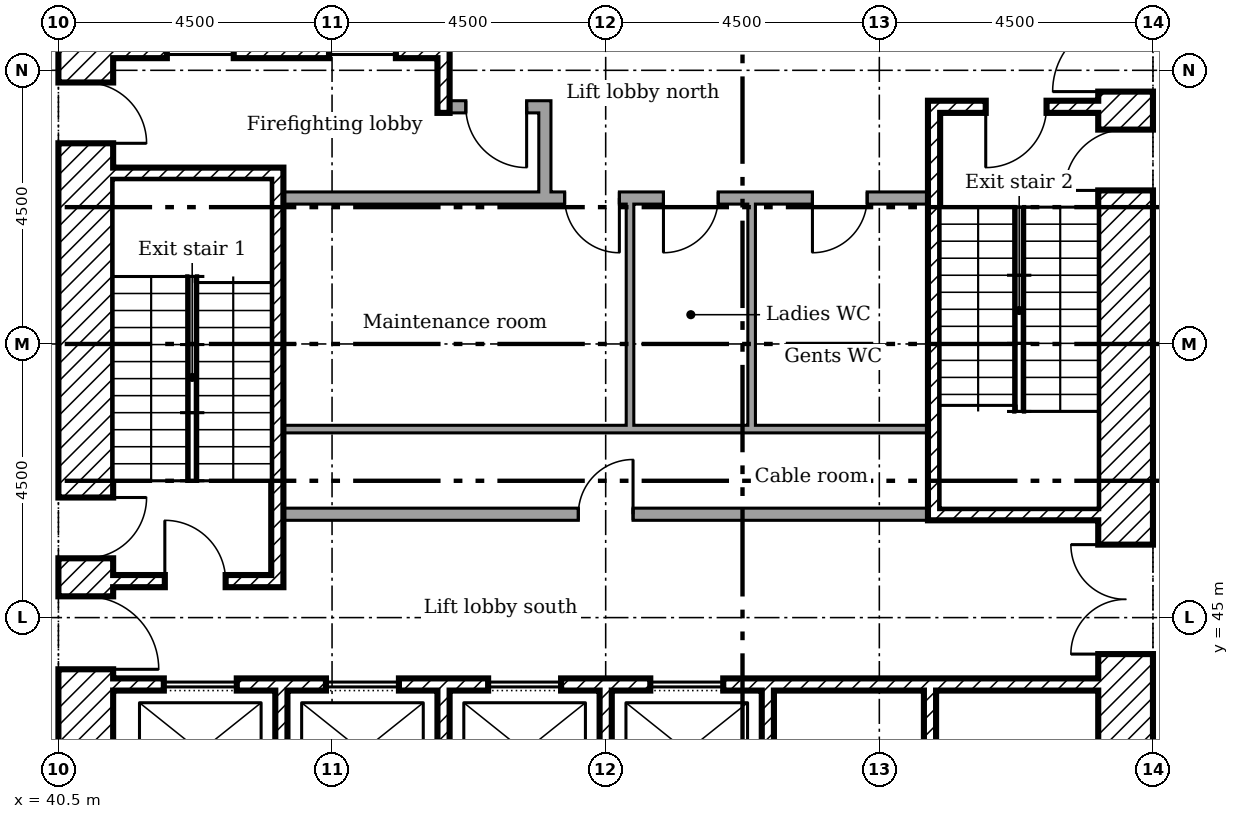
"""IFC4 building model, lengths in metres.
Left out: names, types, materials, properties, quantities, classifications, styles, units other than length and angle.
Written with IfcOpenShell. Run it as: python <this file> out.ifc"""

import sys

from ifc_helpers import new_model, si_unit, direction, frame, frame_2d, origin, place, context, subcontext, project, spatial, rectangle, extrude, element, fill, save


model = new_model("IFC4")
c1 = context("Model", 3, precision=1e-05, world=origin(), true_north=direction((0.0, 1.0)))
c2 = subcontext(c1, "Body", "Model", "MODEL_VIEW")
j1 = project(units=[si_unit("LENGTHUNIT", "METRE"), si_unit("PLANEANGLEUNIT", "RADIAN")], contexts=[c1])
p1 = place(None, origin())
s1 = spatial("IfcSite", under=j1, at=p1, CompositionType="ELEMENT")
p2 = place(p1, origin())
s2 = spatial("IfcBuilding", under=s1, at=p2, CompositionType="ELEMENT")
p3 = place(p2, frame((0.0, 0.0, 43.0)))
s3 = spatial("IfcBuildingStorey", under=s2, at=p3, CompositionType="ELEMENT", Elevation=43.0)
p4 = place(p3, frame((58.05, 40.5, 0.0), z_axis=(0.0, 0.0, 1.0), x_axis=(0.0, 1.0, 0.0)))
e1 = element("IfcWall", 1, at=p4, inside=s3, PredefinedType="SHEAR", context=c2, shape_type="SweptSolid", body=[
    extrude(rectangle(XDim=18.0, YDim=0.9, at=frame_2d((9.0, 0.0))), origin(), (0.0, 0.0, 1.0), 4.15),
])
p5 = place(p4, frame((13.15, 0.0, 0.0)))
e2 = element("IfcOpeningElement", 2, at=p5, cuts=e1, PredefinedType="OPENING", context=c2, shape_type="SweptSolid", body=[
    extrude(rectangle(XDim=1.2, YDim=2.1, at=frame_2d((0.6, 1.05))), frame((0.0, 0.46, 0.0), z_axis=(0.0, -1.0, 0.0), x_axis=(1.0, 0.0, 0.0)), (0.0, 0.0, 1.0), 0.92),
])
p6 = place(p4, frame((3.9, 0.0, 0.0)))
e3 = element("IfcOpeningElement", 3, at=p6, cuts=e1, PredefinedType="OPENING", context=c2, shape_type="SweptSolid", body=[
    extrude(rectangle(XDim=1.8, YDim=2.1, at=frame_2d((0.9, 1.05))), frame((0.0, 0.46, 0.0), z_axis=(0.0, -1.0, 0.0), x_axis=(1.0, 0.0, 0.0)), (0.0, 0.0, 1.0), 0.92),
])
p7 = place(p4, frame((11.525, 0.0, 0.0)))
e4 = element("IfcOpeningElement", 4, at=p7, cuts=e1, PredefinedType="OPENING", context=c2, shape_type="SweptSolid", body=[
    extrude(rectangle(XDim=1.0, YDim=2.1, at=frame_2d((0.5, 1.05))), frame((0.0, 0.46, 0.0), z_axis=(0.0, -1.0, 0.0), x_axis=(1.0, 0.0, 0.0)), (0.0, 0.0, 1.0), 0.92),
])
p8 = place(p3, frame((40.95, 40.5, 0.0), z_axis=(0.0, 0.0, 1.0), x_axis=(0.0, 1.0, 0.0)))
e5 = element("IfcWall", 5, at=p8, inside=s3, PredefinedType="SHEAR", context=c2, shape_type="SweptSolid", body=[
    extrude(rectangle(XDim=18.0, YDim=0.9, at=frame_2d((9.0, 0.0))), origin(), (0.0, 0.0, 1.0), 4.15),
])
p9 = place(p8, frame((3.65, 0.0, 0.0)))
e6 = element("IfcOpeningElement", 6, at=p9, cuts=e5, PredefinedType="OPENING", context=c2, shape_type="SweptSolid", body=[
    extrude(rectangle(XDim=1.2, YDim=2.1, at=frame_2d((0.6, 1.05))), frame((0.0, 0.46, 0.0), z_axis=(0.0, -1.0, 0.0), x_axis=(1.0, 0.0, 0.0)), (0.0, 0.0, 1.0), 0.92),
])
p10 = place(p8, frame((5.475, 0.0, 0.0)))
e7 = element("IfcOpeningElement", 7, at=p10, cuts=e5, PredefinedType="OPENING", context=c2, shape_type="SweptSolid", body=[
    extrude(rectangle(XDim=1.0, YDim=2.1, at=frame_2d((0.5, 1.05))), frame((0.0, 0.46, 0.0), z_axis=(0.0, -1.0, 0.0), x_axis=(1.0, 0.0, 0.0)), (0.0, 0.0, 1.0), 0.92),
])
p11 = place(p8, frame((12.3, 0.0, 0.0)))
e8 = element("IfcOpeningElement", 8, at=p11, cuts=e5, PredefinedType="OPENING", context=c2, shape_type="SweptSolid", body=[
    extrude(rectangle(XDim=1.0, YDim=2.1, at=frame_2d((0.5, 1.05))), frame((0.0, 0.46, 0.0), z_axis=(0.0, -1.0, 0.0), x_axis=(1.0, 0.0, 0.0)), (0.0, 0.0, 1.0), 0.92),
])
p12 = place(p3, frame((46.833, 57.6, 0.0), z_axis=(0.0, 0.0, 1.0), x_axis=(0.0, -1.0, 0.0)))
e9 = element("IfcWall", 9, at=p12, inside=s3, PredefinedType="SHEAR", context=c2, shape_type="SweptSolid", body=[
    extrude(rectangle(XDim=4.3, YDim=0.2, at=frame_2d((2.15, 0.0))), origin(), (0.0, 0.0, 1.0), 4.15),
])
for number, where, z_axis, x_axis in (
    (10, (44.167, 41.4, 0.0), (0.0, 0.0, 1.0), (0.0, 1.0, 0.0)),
    (11, (46.833, 41.4, 0.0), (0.0, 0.0, 1.0), (0.0, 1.0, 0.0)),
    (12, (49.5, 41.4, 0.0), (0.0, 0.0, 1.0), (0.0, 1.0, 0.0)),
    (13, (52.167, 41.4, 0.0), (0.0, 0.0, 1.0), (0.0, 1.0, 0.0)),
    (14, (54.833, 41.4, 0.0), (0.0, 0.0, 1.0), (0.0, 1.0, 0.0)),
):
    element("IfcWall", number, at=place(p3, frame(where, z_axis=z_axis, x_axis=x_axis)), inside=s3, PredefinedType="SHEAR", context=c2, shape_type="SweptSolid", body=[
        extrude(rectangle(XDim=2.4, YDim=0.2, at=frame_2d((1.2, 0.0))), origin(), (0.0, 0.0, 1.0), 4.15),
    ])
p13 = place(p3, frame((48.5, 51.9, 0.0), z_axis=(0.0, 0.0, 1.0), x_axis=(0.0, 1.0, 0.0)))
e15 = element("IfcWall", 15, at=p13, inside=s3, PredefinedType="PARTITIONING", context=c2, shape_type="SweptSolid", body=[
    extrude(rectangle(XDim=1.6, YDim=0.2, at=frame_2d((0.8, 0.0))), origin(), (0.0, 0.0, 1.0), 4.15),
])
p14 = place(p3, frame((46.933, 53.4, 0.0)))
e16 = element("IfcWall", 16, at=p14, inside=s3, PredefinedType="PARTITIONING", context=c2, shape_type="SweptSolid", body=[
    extrude(rectangle(XDim=1.467, YDim=0.2, at=frame_2d((0.733, 0.0))), origin(), (0.0, 0.0, 1.0), 4.15),
])
p15 = place(p14, frame((0.267, 0.0, 0.0)))
e17 = element("IfcOpeningElement", 17, at=p15, cuts=e16, PredefinedType="OPENING", context=c2, shape_type="SweptSolid", body=[
    extrude(rectangle(XDim=1.0, YDim=2.1, at=frame_2d((0.5, 1.05))), frame((0.0, 0.11, 0.0), z_axis=(0.0, -1.0, 0.0), x_axis=(1.0, 0.0, 0.0)), (0.0, 0.0, 1.0), 0.22),
])
p16 = place(p3, frame((41.4, 54.3, 0.0)))
e18 = element("IfcWall", 18, at=p16, inside=s3, PredefinedType="SHEAR", context=c2, shape_type="SweptSolid", body=[
    extrude(rectangle(XDim=5.333, YDim=0.2, at=frame_2d((2.667, 0.0))), origin(), (0.0, 0.0, 1.0), 4.15),
])
p17 = place(p16, frame((0.883, 0.0, 0.0)))
e19 = element("IfcOpeningElement", 19, at=p17, cuts=e18, PredefinedType="OPENING", context=c2, shape_type="SweptSolid", body=[
    extrude(rectangle(XDim=1.1, YDim=2.1, at=frame_2d((0.55, 1.05))), frame((0.0, 0.11, 0.0), z_axis=(0.0, -1.0, 0.0), x_axis=(1.0, 0.0, 0.0)), (0.0, 0.0, 1.0), 0.22),
])
p18 = place(p16, frame((3.55, 0.0, 0.0)))
e20 = element("IfcOpeningElement", 20, at=p18, cuts=e18, PredefinedType="OPENING", context=c2, shape_type="SweptSolid", body=[
    extrude(rectangle(XDim=1.1, YDim=2.1, at=frame_2d((0.55, 1.05))), frame((0.0, 0.11, 0.0), z_axis=(0.0, -1.0, 0.0), x_axis=(1.0, 0.0, 0.0)), (0.0, 0.0, 1.0), 0.22),
])
p19 = place(p3, frame((41.4, 43.9, 0.0)))
e21 = element("IfcWall", 21, at=p19, inside=s3, PredefinedType="SHEAR", context=c2, shape_type="SweptSolid", body=[
    extrude(rectangle(XDim=16.2, YDim=0.2, at=frame_2d((8.1, 0.0))), origin(), (0.0, 0.0, 1.0), 4.15),
])
p20 = place(p19, frame((0.833, 0.0, 0.0)))
e22 = element("IfcOpeningElement", 22, at=p20, cuts=e21, PredefinedType="OPENING", context=c2, shape_type="SweptSolid", body=[
    extrude(rectangle(XDim=1.2, YDim=2.1, at=frame_2d((0.6, 1.05))), frame((0.0, 0.11, 0.0), z_axis=(0.0, -1.0, 0.0), x_axis=(1.0, 0.0, 0.0)), (0.0, 0.0, 1.0), 0.22),
])
p21 = place(p19, frame((3.5, 0.0, 0.0)))
e23 = element("IfcOpeningElement", 23, at=p21, cuts=e21, PredefinedType="OPENING", context=c2, shape_type="SweptSolid", body=[
    extrude(rectangle(XDim=1.2, YDim=2.1, at=frame_2d((0.6, 1.05))), frame((0.0, 0.11, 0.0), z_axis=(0.0, -1.0, 0.0), x_axis=(1.0, 0.0, 0.0)), (0.0, 0.0, 1.0), 0.22),
])
p22 = place(p19, frame((6.167, 0.0, 0.0)))
e24 = element("IfcOpeningElement", 24, at=p22, cuts=e21, PredefinedType="OPENING", context=c2, shape_type="SweptSolid", body=[
    extrude(rectangle(XDim=1.2, YDim=2.1, at=frame_2d((0.6, 1.05))), frame((0.0, 0.11, 0.0), z_axis=(0.0, -1.0, 0.0), x_axis=(1.0, 0.0, 0.0)), (0.0, 0.0, 1.0), 0.22),
])
p23 = place(p19, frame((8.833, 0.0, 0.0)))
e25 = element("IfcOpeningElement", 25, at=p23, cuts=e21, PredefinedType="OPENING", context=c2, shape_type="SweptSolid", body=[
    extrude(rectangle(XDim=1.2, YDim=2.1, at=frame_2d((0.6, 1.05))), frame((0.0, 0.11, 0.0), z_axis=(0.0, -1.0, 0.0), x_axis=(1.0, 0.0, 0.0)), (0.0, 0.0, 1.0), 0.22),
])
p24 = place(p3, frame((44.1, 45.5, 0.0), z_axis=(0.0, 0.0, 1.0), x_axis=(0.0, 1.0, 0.0)))
e26 = element("IfcWall", 26, at=p24, inside=s3, PredefinedType="SHEAR", context=c2, shape_type="SweptSolid", body=[
    extrude(rectangle(XDim=6.9, YDim=0.2, at=frame_2d((3.45, 0.0))), origin(), (0.0, 0.0, 1.0), 4.15),
])
p25 = place(p3, frame((41.4, 52.3, 0.0)))
e27 = element("IfcWall", 27, at=p25, inside=s3, PredefinedType="SHEAR", context=c2, shape_type="SweptSolid", body=[
    extrude(rectangle(XDim=2.6, YDim=0.2, at=frame_2d((1.3, 0.0))), origin(), (0.0, 0.0, 1.0), 4.15),
])
p26 = place(p3, frame((41.4, 45.6, 0.0)))
e28 = element("IfcWall", 28, at=p26, inside=s3, PredefinedType="SHEAR", context=c2, shape_type="SweptSolid", body=[
    extrude(rectangle(XDim=2.6, YDim=0.2, at=frame_2d((1.3, 0.0))), origin(), (0.0, 0.0, 1.0), 4.15),
])
p27 = place(p26, frame((0.85, 0.0, 0.0)))
e29 = element("IfcOpeningElement", 29, at=p27, cuts=e28, PredefinedType="OPENING", context=c2, shape_type="SweptSolid", body=[
    extrude(rectangle(XDim=1.0, YDim=2.1, at=frame_2d((0.5, 1.05))), frame((0.0, 0.11, 0.0), z_axis=(0.0, -1.0, 0.0), x_axis=(1.0, 0.0, 0.0)), (0.0, 0.0, 1.0), 0.22),
])
p28 = place(p3, frame((54.8, 53.4, 0.0)))
e30 = element("IfcWall", 30, at=p28, inside=s3, PredefinedType="SHEAR", context=c2, shape_type="SweptSolid", body=[
    extrude(rectangle(XDim=2.8, YDim=0.2, at=frame_2d((1.4, 0.0))), origin(), (0.0, 0.0, 1.0), 4.15),
])
p29 = place(p28, frame((0.95, 0.0, 0.0)))
e31 = element("IfcOpeningElement", 31, at=p29, cuts=e30, PredefinedType="OPENING", context=c2, shape_type="SweptSolid", body=[
    extrude(rectangle(XDim=1.0, YDim=2.1, at=frame_2d((0.5, 1.05))), frame((0.0, 0.11, 0.0), z_axis=(0.0, -1.0, 0.0), x_axis=(1.0, 0.0, 0.0)), (0.0, 0.0, 1.0), 0.22),
])
p30 = place(p3, frame((54.8, 46.7, 0.0)))
e32 = element("IfcWall", 32, at=p30, inside=s3, PredefinedType="SHEAR", context=c2, shape_type="SweptSolid", body=[
    extrude(rectangle(XDim=2.8, YDim=0.2, at=frame_2d((1.4, 0.0))), origin(), (0.0, 0.0, 1.0), 4.15),
])
p31 = place(p3, frame((54.9, 46.8, 0.0), z_axis=(0.0, 0.0, 1.0), x_axis=(0.0, 1.0, 0.0)))
e33 = element("IfcWall", 33, at=p31, inside=s3, PredefinedType="SHEAR", context=c2, shape_type="SweptSolid", body=[
    extrude(rectangle(XDim=6.5, YDim=0.2, at=frame_2d((3.25, 0.0))), origin(), (0.0, 0.0, 1.0), 4.15),
])
p32 = place(p3, frame((44.2, 51.9, 0.0)))
e34 = element("IfcWall", 34, at=p32, inside=s3, PredefinedType="PARTITIONING", context=c2, shape_type="SweptSolid", body=[
    extrude(rectangle(XDim=10.6, YDim=0.2, at=frame_2d((5.3, 0.0))), origin(), (0.0, 0.0, 1.0), 4.15),
])
p33 = place(p32, frame((4.625, 0.0, 0.0)))
e35 = element("IfcOpeningElement", 35, at=p33, cuts=e34, PredefinedType="OPENING", context=c2, shape_type="SweptSolid", body=[
    extrude(rectangle(XDim=0.9, YDim=2.1, at=frame_2d((0.45, 1.05))), frame((0.0, 0.11, 0.0), z_axis=(0.0, -1.0, 0.0), x_axis=(1.0, 0.0, 0.0)), (0.0, 0.0, 1.0), 0.22),
])
p34 = place(p32, frame((6.25, 0.0, 0.0)))
e36 = element("IfcOpeningElement", 36, at=p34, cuts=e34, PredefinedType="OPENING", context=c2, shape_type="SweptSolid", body=[
    extrude(rectangle(XDim=0.9, YDim=2.1, at=frame_2d((0.45, 1.05))), frame((0.0, 0.11, 0.0), z_axis=(0.0, -1.0, 0.0), x_axis=(1.0, 0.0, 0.0)), (0.0, 0.0, 1.0), 0.22),
])
p35 = place(p32, frame((8.7, 0.0, 0.0)))
e37 = element("IfcOpeningElement", 37, at=p35, cuts=e34, PredefinedType="OPENING", context=c2, shape_type="SweptSolid", body=[
    extrude(rectangle(XDim=0.9, YDim=2.1, at=frame_2d((0.45, 1.05))), frame((0.0, 0.11, 0.0), z_axis=(0.0, -1.0, 0.0), x_axis=(1.0, 0.0, 0.0)), (0.0, 0.0, 1.0), 0.22),
])
p36 = place(p3, frame((44.2, 46.7, 0.0)))
e38 = element("IfcWall", 38, at=p36, inside=s3, PredefinedType="PARTITIONING", context=c2, shape_type="SweptSolid", body=[
    extrude(rectangle(XDim=10.6, YDim=0.2, at=frame_2d((5.3, 0.0))), origin(), (0.0, 0.0, 1.0), 4.15),
])
p37 = place(p36, frame((4.85, 0.0, 0.0)))
e39 = element("IfcOpeningElement", 39, at=p37, cuts=e38, PredefinedType="OPENING", context=c2, shape_type="SweptSolid", body=[
    extrude(rectangle(XDim=0.9, YDim=2.1, at=frame_2d((0.45, 1.05))), frame((0.0, 0.11, 0.0), z_axis=(0.0, -1.0, 0.0), x_axis=(1.0, 0.0, 0.0)), (0.0, 0.0, 1.0), 0.22),
])
p38 = place(p3, frame((49.962, 48.1, 0.0), z_axis=(0.0, 0.0, 1.0), x_axis=(-1.0, 0.0, 0.0)))
e40 = element("IfcWall", 40, at=p38, inside=s3, PredefinedType="PARTITIONING", context=c2, shape_type="SweptSolid", body=[
    extrude(rectangle(XDim=5.762, YDim=0.125, at=frame_2d((2.881, 0.0))), origin(), (0.0, 0.0, 1.0), 4.15),
])
p39 = place(p3, frame((51.962, 48.1, 0.0), z_axis=(0.0, 0.0, 1.0), x_axis=(-1.0, 0.0, 0.0)))
e41 = element("IfcWall", 41, at=p39, inside=s3, PredefinedType="PARTITIONING", context=c2, shape_type="SweptSolid", body=[
    extrude(rectangle(XDim=2.062, YDim=0.125, at=frame_2d((1.031, 0.0))), origin(), (0.0, 0.0, 1.0), 4.15),
])
p40 = place(p3, frame((49.9, 48.163, 0.0), z_axis=(0.0, 0.0, 1.0), x_axis=(0.0, 1.0, 0.0)))
e42 = element("IfcWall", 42, at=p40, inside=s3, PredefinedType="PARTITIONING", context=c2, shape_type="SweptSolid", body=[
    extrude(rectangle(XDim=3.637, YDim=0.125, at=frame_2d((1.819, 0.0))), origin(), (0.0, 0.0, 1.0), 4.15),
])
p41 = place(p3, frame((54.8, 48.1, 0.0), z_axis=(0.0, 0.0, 1.0), x_axis=(-1.0, 0.0, 0.0)))
e43 = element("IfcWall", 43, at=p41, inside=s3, PredefinedType="PARTITIONING", context=c2, shape_type="SweptSolid", body=[
    extrude(rectangle(XDim=2.9, YDim=0.125, at=frame_2d((1.45, 0.0))), origin(), (0.0, 0.0, 1.0), 4.15),
])
p42 = place(p3, frame((51.9, 48.163, 0.0), z_axis=(0.0, 0.0, 1.0), x_axis=(0.0, 1.0, 0.0)))
e44 = element("IfcWall", 44, at=p42, inside=s3, PredefinedType="PARTITIONING", context=c2, shape_type="SweptSolid", body=[
    extrude(rectangle(XDim=3.637, YDim=0.125, at=frame_2d((1.819, 0.0))), origin(), (0.0, 0.0, 1.0), 4.15),
])
p43 = place(p5, origin())
e45 = element("IfcDoor", 45, at=p43, inside=s3, OperationType="SINGLE_SWING_RIGHT", PredefinedType="DOOR", context=c2, shape_type="SweptSolid", body=[
    extrude(rectangle(XDim=1.2, YDim=2.1, at=frame_2d((0.6, 1.05))), frame((0.0, 0.025, 0.0), z_axis=(0.0, -1.0, 0.0), x_axis=(1.0, 0.0, 0.0)), (0.0, 0.0, 1.0), 0.05),
])
fill(e2, e45)
p44 = place(p6, origin())
e46 = element("IfcDoor", 46, at=p44, inside=s3, OperationType="DOUBLE_DOOR_SINGLE_SWING", PredefinedType="DOOR", context=c2, shape_type="SweptSolid", body=[
    extrude(rectangle(XDim=1.8, YDim=2.1, at=frame_2d((0.9, 1.05))), frame((0.0, 0.025, 0.0), z_axis=(0.0, -1.0, 0.0), x_axis=(1.0, 0.0, 0.0)), (0.0, 0.0, 1.0), 0.05),
])
fill(e3, e46)
p45 = place(p9, frame((1.2, 0.0, 0.0), x_axis=(-1.0, 0.0, 0.0)))
e47 = element("IfcDoor", 47, at=p45, inside=s3, OperationType="SINGLE_SWING_LEFT", PredefinedType="DOOR", context=c2, shape_type="SweptSolid", body=[
    extrude(rectangle(XDim=1.2, YDim=2.1, at=frame_2d((0.6, 1.05))), frame((0.0, 0.025, 0.0), z_axis=(0.0, -1.0, 0.0), x_axis=(1.0, 0.0, 0.0)), (0.0, 0.0, 1.0), 0.05),
])
fill(e6, e47)
p46 = place(p27, origin())
e48 = element("IfcDoor", 48, at=p46, inside=s3, OperationType="SINGLE_SWING_RIGHT", PredefinedType="DOOR", context=c2, shape_type="SweptSolid", body=[
    extrude(rectangle(XDim=1.0, YDim=2.1, at=frame_2d((0.5, 1.05))), frame((0.0, 0.025, 0.0), z_axis=(0.0, -1.0, 0.0), x_axis=(1.0, 0.0, 0.0)), (0.0, 0.0, 1.0), 0.05),
])
fill(e29, e48)
p47 = place(p10, frame((1.0, 0.0, 0.0), x_axis=(-1.0, 0.0, 0.0)))
e49 = element("IfcDoor", 49, at=p47, inside=s3, OperationType="SINGLE_SWING_RIGHT", PredefinedType="DOOR", context=c2, shape_type="SweptSolid", body=[
    extrude(rectangle(XDim=1.0, YDim=2.1, at=frame_2d((0.5, 1.05))), frame((0.0, 0.025, 0.0), z_axis=(0.0, -1.0, 0.0), x_axis=(1.0, 0.0, 0.0)), (0.0, 0.0, 1.0), 0.05),
])
fill(e7, e49)
p48 = place(p29, frame((1.0, 0.0, 0.0), x_axis=(-1.0, 0.0, 0.0)))
e50 = element("IfcDoor", 50, at=p48, inside=s3, OperationType="SINGLE_SWING_LEFT", PredefinedType="DOOR", context=c2, shape_type="SweptSolid", body=[
    extrude(rectangle(XDim=1.0, YDim=2.1, at=frame_2d((0.5, 1.05))), frame((0.0, 0.025, 0.0), z_axis=(0.0, -1.0, 0.0), x_axis=(1.0, 0.0, 0.0)), (0.0, 0.0, 1.0), 0.05),
])
fill(e31, e50)
p49 = place(p7, origin())
e51 = element("IfcDoor", 51, at=p49, inside=s3, OperationType="SINGLE_SWING_RIGHT", PredefinedType="DOOR", context=c2, shape_type="SweptSolid", body=[
    extrude(rectangle(XDim=1.0, YDim=2.1, at=frame_2d((0.5, 1.05))), frame((0.0, 0.025, 0.0), z_axis=(0.0, -1.0, 0.0), x_axis=(1.0, 0.0, 0.0)), (0.0, 0.0, 1.0), 0.05),
])
fill(e4, e51)
p50 = place(p15, frame((1.0, 0.0, 0.0), x_axis=(-1.0, 0.0, 0.0)))
e52 = element("IfcDoor", 52, at=p50, inside=s3, OperationType="SINGLE_SWING_RIGHT", PredefinedType="DOOR", context=c2, shape_type="SweptSolid", body=[
    extrude(rectangle(XDim=1.0, YDim=2.1, at=frame_2d((0.5, 1.05))), frame((0.0, 0.025, 0.0), z_axis=(0.0, -1.0, 0.0), x_axis=(1.0, 0.0, 0.0)), (0.0, 0.0, 1.0), 0.05),
])
fill(e17, e52)
p51 = place(p11, frame((1.0, 0.0, 0.0), x_axis=(-1.0, 0.0, 0.0)))
e53 = element("IfcDoor", 53, at=p51, inside=s3, OperationType="SINGLE_SWING_LEFT", PredefinedType="DOOR", context=c2, shape_type="SweptSolid", body=[
    extrude(rectangle(XDim=1.0, YDim=2.1, at=frame_2d((0.5, 1.05))), frame((0.0, 0.025, 0.0), z_axis=(0.0, -1.0, 0.0), x_axis=(1.0, 0.0, 0.0)), (0.0, 0.0, 1.0), 0.05),
])
fill(e8, e53)
p52 = place(p37, origin())
e54 = element("IfcDoor", 54, at=p52, inside=s3, OperationType="SINGLE_SWING_LEFT", PredefinedType="DOOR", context=c2, shape_type="SweptSolid", body=[
    extrude(rectangle(XDim=0.9, YDim=2.1, at=frame_2d((0.45, 1.05))), frame((0.0, 0.025, 0.0), z_axis=(0.0, -1.0, 0.0), x_axis=(1.0, 0.0, 0.0)), (0.0, 0.0, 1.0), 0.05),
])
fill(e39, e54)
p53 = place(p33, frame((0.9, 0.0, 0.0), x_axis=(-1.0, 0.0, 0.0)))
e55 = element("IfcDoor", 55, at=p53, inside=s3, OperationType="SINGLE_SWING_RIGHT", PredefinedType="DOOR", context=c2, shape_type="SweptSolid", body=[
    extrude(rectangle(XDim=0.9, YDim=2.1, at=frame_2d((0.45, 1.05))), frame((0.0, 0.025, 0.0), z_axis=(0.0, -1.0, 0.0), x_axis=(1.0, 0.0, 0.0)), (0.0, 0.0, 1.0), 0.05),
])
fill(e35, e55)
p54 = place(p34, frame((0.9, 0.0, 0.0), x_axis=(-1.0, 0.0, 0.0)))
e56 = element("IfcDoor", 56, at=p54, inside=s3, OperationType="SINGLE_SWING_LEFT", PredefinedType="DOOR", context=c2, shape_type="SweptSolid", body=[
    extrude(rectangle(XDim=0.9, YDim=2.1, at=frame_2d((0.45, 1.05))), frame((0.0, 0.025, 0.0), z_axis=(0.0, -1.0, 0.0), x_axis=(1.0, 0.0, 0.0)), (0.0, 0.0, 1.0), 0.05),
])
fill(e36, e56)
p55 = place(p35, frame((0.9, 0.0, 0.0), x_axis=(-1.0, 0.0, 0.0)))
e57 = element("IfcDoor", 57, at=p55, inside=s3, OperationType="SINGLE_SWING_LEFT", PredefinedType="DOOR", context=c2, shape_type="SweptSolid", body=[
    extrude(rectangle(XDim=0.9, YDim=2.1, at=frame_2d((0.45, 1.05))), frame((0.0, 0.025, 0.0), z_axis=(0.0, -1.0, 0.0), x_axis=(1.0, 0.0, 0.0)), (0.0, 0.0, 1.0), 0.05),
])
fill(e37, e57)
p56 = place(p17, origin())
e58 = element("IfcDoor", 58, at=p56, inside=s3, OperationType="SLIDING_TO_LEFT", PredefinedType="DOOR", context=c2, shape_type="SweptSolid", body=[
    extrude(rectangle(XDim=1.1, YDim=2.1, at=frame_2d((0.55, 1.05))), frame((0.0, 0.025, 0.0), z_axis=(0.0, -1.0, 0.0), x_axis=(1.0, 0.0, 0.0)), (0.0, 0.0, 1.0), 0.05),
])
fill(e19, e58)
p57 = place(p18, origin())
e59 = element("IfcDoor", 59, at=p57, inside=s3, OperationType="SLIDING_TO_LEFT", PredefinedType="DOOR", context=c2, shape_type="SweptSolid", body=[
    extrude(rectangle(XDim=1.1, YDim=2.1, at=frame_2d((0.55, 1.05))), frame((0.0, 0.025, 0.0), z_axis=(0.0, -1.0, 0.0), x_axis=(1.0, 0.0, 0.0)), (0.0, 0.0, 1.0), 0.05),
])
fill(e20, e59)
p58 = place(p20, origin())
e60 = element("IfcDoor", 60, at=p58, inside=s3, OperationType="SLIDING_TO_LEFT", PredefinedType="DOOR", context=c2, shape_type="SweptSolid", body=[
    extrude(rectangle(XDim=1.2, YDim=2.1, at=frame_2d((0.6, 1.05))), frame((0.0, 0.025, 0.0), z_axis=(0.0, -1.0, 0.0), x_axis=(1.0, 0.0, 0.0)), (0.0, 0.0, 1.0), 0.05),
])
fill(e22, e60)
p59 = place(p21, origin())
e61 = element("IfcDoor", 61, at=p59, inside=s3, OperationType="SLIDING_TO_LEFT", PredefinedType="DOOR", context=c2, shape_type="SweptSolid", body=[
    extrude(rectangle(XDim=1.2, YDim=2.1, at=frame_2d((0.6, 1.05))), frame((0.0, 0.025, 0.0), z_axis=(0.0, -1.0, 0.0), x_axis=(1.0, 0.0, 0.0)), (0.0, 0.0, 1.0), 0.05),
])
fill(e23, e61)
p60 = place(p22, origin())
e62 = element("IfcDoor", 62, at=p60, inside=s3, OperationType="SLIDING_TO_LEFT", PredefinedType="DOOR", context=c2, shape_type="SweptSolid", body=[
    extrude(rectangle(XDim=1.2, YDim=2.1, at=frame_2d((0.6, 1.05))), frame((0.0, 0.025, 0.0), z_axis=(0.0, -1.0, 0.0), x_axis=(1.0, 0.0, 0.0)), (0.0, 0.0, 1.0), 0.05),
])
fill(e24, e62)
p61 = place(p23, origin())
e63 = element("IfcDoor", 63, at=p61, inside=s3, OperationType="SLIDING_TO_LEFT", PredefinedType="DOOR", context=c2, shape_type="SweptSolid", body=[
    extrude(rectangle(XDim=1.2, YDim=2.1, at=frame_2d((0.6, 1.05))), frame((0.0, 0.025, 0.0), z_axis=(0.0, -1.0, 0.0), x_axis=(1.0, 0.0, 0.0)), (0.0, 0.0, 1.0), 0.05),
])
fill(e25, e63)
save(model, sys.argv[1])
